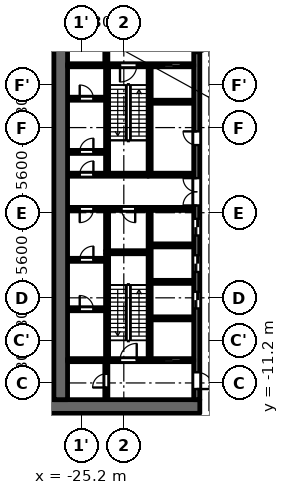
"""IFC4 building model, lengths in metres.
Left out: names, types, materials, properties, quantities, classifications, styles, units other than length and angle.
Written with IfcOpenShell. Run it as: python <this file> out.ifc"""

import sys

from ifc_helpers import new_model, si_unit, direction, frame, frame_2d, origin, place, context, subcontext, project, spatial, rectangle, extrude, element, fill, save


model = new_model("IFC4")
c1 = context("Model", 3, precision=1e-05, world=origin(), true_north=direction((0.0, 1.0)))
c2 = subcontext(c1, "Body", "Model", "MODEL_VIEW")
j1 = project(units=[si_unit("LENGTHUNIT", "METRE"), si_unit("PLANEANGLEUNIT", "RADIAN")], contexts=[c1])
p1 = place(None, origin())
s1 = spatial("IfcSite", under=j1, at=p1, CompositionType="ELEMENT")
p2 = place(p1, origin())
s2 = spatial("IfcBuilding", under=s1, at=p2, CompositionType="ELEMENT")
p3 = place(p2, frame((0.0, 0.0, 25.7)))
s3 = spatial("IfcBuildingStorey", under=s2, at=p3, CompositionType="ELEMENT", Elevation=25.7)
p4 = place(p3, frame((-23.5, -2.5, 0.0), z_axis=(0.0, 0.0, 1.0), x_axis=(0.0, 1.0, 0.0)))
e1 = element("IfcWall", 1, at=p4, inside=s3, PredefinedType="PARTITIONING", context=c2, shape_type="SweptSolid", body=[
    extrude(rectangle(XDim=2.65, YDim=0.2, at=frame_2d((1.325, 0.0))), origin(), (0.0, 0.0, 1.0), 4.45),
])
p5 = place(p3, frame((-20.7, 2.6, 0.0), z_axis=(0.0, 0.0, 1.0), x_axis=(0.0, 1.0, 0.0)))
e2 = element("IfcWall", 2, at=p5, inside=s3, PredefinedType="SHEAR", context=c2, shape_type="SweptSolid", body=[
    extrude(rectangle(XDim=7.0, YDim=0.2, at=frame_2d((3.5, 0.0))), origin(), (0.0, 0.0, 1.0), 4.45),
])
p6 = place(p3, frame((-20.7, -9.6, 0.0), z_axis=(0.0, 0.0, 1.0), x_axis=(0.0, 1.0, 0.0)))
e3 = element("IfcWall", 3, at=p6, inside=s3, PredefinedType="SHEAR", context=c2, shape_type="SweptSolid", body=[
    extrude(rectangle(XDim=9.75, YDim=0.2, at=frame_2d((4.875, 0.0))), origin(), (0.0, 0.0, 1.0), 4.45),
])
p7 = place(p3, frame((-20.8, 2.5, 0.0), z_axis=(0.0, 0.0, 1.0), x_axis=(-1.0, 0.0, 0.0)))
e4 = element("IfcWall", 4, at=p7, inside=s3, PredefinedType="SHEAR", context=c2, shape_type="SweptSolid", body=[
    extrude(rectangle(XDim=5.3, YDim=0.2, at=frame_2d((2.65, 0.0))), origin(), (0.0, 0.0, 1.0), 4.45),
])
p8 = place(p7, frame((3.6, 0.0, 0.0)))
e5 = element("IfcOpeningElement", 5, at=p8, cuts=e4, PredefinedType="OPENING", context=c2, shape_type="SweptSolid", body=[
    extrude(rectangle(XDim=0.9, YDim=2.1, at=frame_2d((0.45, 1.05))), frame((0.0, 0.11, 0.0), z_axis=(0.0, -1.0, 0.0), x_axis=(1.0, 0.0, 0.0)), (0.0, 0.0, 1.0), 0.22),
])
p9 = place(p3, frame((-20.8, 0.25, 0.0), z_axis=(0.0, 0.0, 1.0), x_axis=(-1.0, 0.0, 0.0)))
e6 = element("IfcWall", 6, at=p9, inside=s3, PredefinedType="PARTITIONING", context=c2, shape_type="SweptSolid", body=[
    extrude(rectangle(XDim=5.3, YDim=0.2, at=frame_2d((2.65, 0.0))), origin(), (0.0, 0.0, 1.0), 4.45),
])
p10 = place(p9, frame((0.85, 0.0, 0.0)))
e7 = element("IfcOpeningElement", 7, at=p10, cuts=e6, PredefinedType="OPENING", context=c2, shape_type="SweptSolid", body=[
    extrude(rectangle(XDim=0.9, YDim=2.1, at=frame_2d((0.45, 1.05))), frame((0.0, 0.11, 0.0), z_axis=(0.0, -1.0, 0.0), x_axis=(1.0, 0.0, 0.0)), (0.0, 0.0, 1.0), 0.22),
])
p11 = place(p9, frame((3.6, 0.0, 0.0)))
e8 = element("IfcOpeningElement", 8, at=p11, cuts=e6, PredefinedType="OPENING", context=c2, shape_type="SweptSolid", body=[
    extrude(rectangle(XDim=0.9, YDim=2.1, at=frame_2d((0.45, 1.05))), frame((0.0, 0.11, 0.0), z_axis=(0.0, -1.0, 0.0), x_axis=(1.0, 0.0, 0.0)), (0.0, 0.0, 1.0), 0.22),
])
p12 = place(p3, frame((-17.4, -12.75, 0.0), z_axis=(0.0, 0.0, 1.0), x_axis=(-1.0, 0.0, 0.0)))
e9 = element("IfcWall", 9, at=p12, inside=s3, PredefinedType="SHEAR", context=c2, shape_type="SweptSolid", body=[
    extrude(rectangle(XDim=10.4, YDim=0.9, at=frame_2d((5.2, 0.0))), origin(), (0.0, 0.0, 1.0), 4.45),
])
p13 = place(p3, frame((-17.6, -12.3, 0.0), z_axis=(0.0, 0.0, 1.0), x_axis=(0.0, 1.0, 0.0)))
e10 = element("IfcWall", 10, at=p13, inside=s3, PredefinedType="SHEAR", context=c2, shape_type="SweptSolid", body=[
    extrude(rectangle(XDim=24.6, YDim=0.4, at=frame_2d((12.3, 0.0))), origin(), (0.0, 0.0, 1.0), 4.45),
])
p14 = place(p13, frame((6.0, 0.0, 0.0)))
e11 = element("IfcOpeningElement", 11, at=p14, cuts=e10, PredefinedType="OPENING", context=c2, shape_type="SweptSolid", body=[
    extrude(rectangle(XDim=1.1, YDim=2.1, at=frame_2d((0.55, 1.05))), frame((0.0, 0.21, 0.0), z_axis=(0.0, -1.0, 0.0), x_axis=(1.0, 0.0, 0.0)), (0.0, 0.0, 1.0), 0.42),
])
p15 = place(p13, frame((8.4, 0.0, 0.0)))
e12 = element("IfcOpeningElement", 12, at=p15, cuts=e10, PredefinedType="OPENING", context=c2, shape_type="SweptSolid", body=[
    extrude(rectangle(XDim=1.1, YDim=2.1, at=frame_2d((0.55, 1.05))), frame((0.0, 0.21, 0.0), z_axis=(0.0, -1.0, 0.0), x_axis=(1.0, 0.0, 0.0)), (0.0, 0.0, 1.0), 0.42),
])
p16 = place(p13, frame((10.8, 0.0, 0.0)))
e13 = element("IfcOpeningElement", 13, at=p16, cuts=e10, PredefinedType="OPENING", context=c2, shape_type="SweptSolid", body=[
    extrude(rectangle(XDim=1.1, YDim=2.1, at=frame_2d((0.55, 1.05))), frame((0.0, 0.21, 0.0), z_axis=(0.0, -1.0, 0.0), x_axis=(1.0, 0.0, 0.0)), (0.0, 0.0, 1.0), 0.42),
])
p17 = place(p13, frame((16.75, 0.0, 0.0)))
e14 = element("IfcOpeningElement", 14, at=p17, cuts=e10, PredefinedType="OPENING", context=c2, shape_type="SweptSolid", body=[
    extrude(rectangle(XDim=0.9, YDim=2.1, at=frame_2d((0.45, 1.05))), frame((0.0, 0.21, 0.0), z_axis=(0.0, -1.0, 0.0), x_axis=(1.0, 0.0, 0.0)), (0.0, 0.0, 1.0), 0.42),
])
p18 = place(p13, frame((22.8, 0.0, 0.0)))
e15 = element("IfcOpeningElement", 15, at=p18, cuts=e10, PredefinedType="OPENING", context=c2, shape_type="SweptSolid", body=[
    extrude(rectangle(XDim=1.1, YDim=2.1, at=frame_2d((0.55, 1.05))), frame((0.0, 0.21, 0.0), z_axis=(0.0, -1.0, 0.0), x_axis=(1.0, 0.0, 0.0)), (0.0, 0.0, 1.0), 0.42),
])
p19 = place(p13, frame((0.7, 0.0, 0.0)))
e16 = element("IfcOpeningElement", 16, at=p19, cuts=e10, PredefinedType="OPENING", context=c2, shape_type="SweptSolid", body=[
    extrude(rectangle(XDim=1.1, YDim=2.1, at=frame_2d((0.55, 1.05))), frame((0.0, 0.21, 0.0), z_axis=(0.0, -1.0, 0.0), x_axis=(1.0, 0.0, 0.0)), (0.0, 0.0, 1.0), 0.42),
])
p20 = place(p13, frame((12.775, 0.0, 0.0)))
e17 = element("IfcOpeningElement", 17, at=p20, cuts=e10, PredefinedType="OPENING", context=c2, shape_type="SweptSolid", body=[
    extrude(rectangle(XDim=1.8, YDim=2.1, at=frame_2d((0.9, 1.05))), frame((0.0, 0.21, 0.0), z_axis=(0.0, -1.0, 0.0), x_axis=(1.0, 0.0, 0.0)), (0.0, 0.0, 1.0), 0.42),
])
p21 = place(p3, frame((-26.55, -12.3, 0.0), z_axis=(0.0, 0.0, 1.0), x_axis=(0.0, 1.0, 0.0)))
e18 = element("IfcWall", 18, at=p21, inside=s3, PredefinedType="SHEAR", context=c2, shape_type="SweptSolid", body=[
    extrude(rectangle(XDim=24.6, YDim=0.9, at=frame_2d((12.3, 0.0))), origin(), (0.0, 0.0, 1.0), 4.45),
])
p22 = place(p3, frame((-23.55, 9.8, 0.0), z_axis=(0.0, 0.0, 1.0), x_axis=(0.0, 1.0, 0.0)))
e19 = element("IfcWall", 19, at=p22, inside=s3, PredefinedType="PARTITIONING", context=c2, shape_type="SweptSolid", body=[
    extrude(rectangle(XDim=2.5, YDim=0.2, at=frame_2d((1.25, 0.0))), origin(), (0.0, 0.0, 1.0), 4.45),
])
p23 = place(p22, frame((0.8, 0.0, 0.0)))
e20 = element("IfcOpeningElement", 20, at=p23, cuts=e19, PredefinedType="OPENING", context=c2, shape_type="SweptSolid", body=[
    extrude(rectangle(XDim=0.9, YDim=2.1, at=frame_2d((0.45, 1.05))), frame((0.0, 0.11, 0.0), z_axis=(0.0, -1.0, 0.0), x_axis=(1.0, 0.0, 0.0)), (0.0, 0.0, 1.0), 0.22),
])
p24 = place(p3, frame((-23.55, -12.3, 0.0), z_axis=(0.0, 0.0, 1.0), x_axis=(0.0, 1.0, 0.0)))
e21 = element("IfcWall", 21, at=p24, inside=s3, PredefinedType="PARTITIONING", context=c2, shape_type="SweptSolid", body=[
    extrude(rectangle(XDim=2.5, YDim=0.2, at=frame_2d((1.25, 0.0))), origin(), (0.0, 0.0, 1.0), 4.45),
])
p25 = place(p24, frame((0.8, 0.0, 0.0)))
e22 = element("IfcOpeningElement", 22, at=p25, cuts=e21, PredefinedType="OPENING", context=c2, shape_type="SweptSolid", body=[
    extrude(rectangle(XDim=0.9, YDim=2.1, at=frame_2d((0.45, 1.05))), frame((0.0, 0.11, 0.0), z_axis=(0.0, -1.0, 0.0), x_axis=(1.0, 0.0, 0.0)), (0.0, 0.0, 1.0), 0.22),
])
p26 = place(p3, frame((-23.6, -6.35, 0.0), z_axis=(0.0, 0.0, 1.0), x_axis=(-1.0, 0.0, 0.0)))
e23 = element("IfcWall", 23, at=p26, inside=s3, PredefinedType="PARTITIONING", context=c2, shape_type="SweptSolid", body=[
    extrude(rectangle(XDim=2.5, YDim=0.2, at=frame_2d((1.25, 0.0))), origin(), (0.0, 0.0, 1.0), 4.45),
])
p27 = place(p26, frame((0.8, 0.0, 0.0)))
e24 = element("IfcOpeningElement", 24, at=p27, cuts=e23, PredefinedType="OPENING", context=c2, shape_type="SweptSolid", body=[
    extrude(rectangle(XDim=0.9, YDim=2.1, at=frame_2d((0.45, 1.05))), frame((0.0, 0.11, 0.0), z_axis=(0.0, -1.0, 0.0), x_axis=(1.0, 0.0, 0.0)), (0.0, 0.0, 1.0), 0.22),
])
p28 = place(p3, frame((-23.6, -3.1, 0.0), z_axis=(0.0, 0.0, 1.0), x_axis=(-1.0, 0.0, 0.0)))
e25 = element("IfcWall", 25, at=p28, inside=s3, PredefinedType="PARTITIONING", context=c2, shape_type="SweptSolid", body=[
    extrude(rectangle(XDim=2.5, YDim=0.2, at=frame_2d((1.25, 0.0))), origin(), (0.0, 0.0, 1.0), 4.45),
])
p29 = place(p28, frame((0.8, 0.0, 0.0)))
e26 = element("IfcOpeningElement", 26, at=p29, cuts=e25, PredefinedType="OPENING", context=c2, shape_type="SweptSolid", body=[
    extrude(rectangle(XDim=0.9, YDim=2.1, at=frame_2d((0.45, 1.05))), frame((0.0, 0.11, 0.0), z_axis=(0.0, -1.0, 0.0), x_axis=(1.0, 0.0, 0.0)), (0.0, 0.0, 1.0), 0.22),
])
p30 = place(p3, frame((-23.6, 4.0, 0.0), z_axis=(0.0, 0.0, 1.0), x_axis=(-1.0, 0.0, 0.0)))
e27 = element("IfcWall", 27, at=p30, inside=s3, PredefinedType="PARTITIONING", context=c2, shape_type="SweptSolid", body=[
    extrude(rectangle(XDim=2.5, YDim=0.2, at=frame_2d((1.25, 0.0))), origin(), (0.0, 0.0, 1.0), 4.45),
])
p31 = place(p30, frame((0.8, 0.0, 0.0)))
e28 = element("IfcOpeningElement", 28, at=p31, cuts=e27, PredefinedType="OPENING", context=c2, shape_type="SweptSolid", body=[
    extrude(rectangle(XDim=0.9, YDim=2.1, at=frame_2d((0.45, 1.05))), frame((0.0, 0.11, 0.0), z_axis=(0.0, -1.0, 0.0), x_axis=(1.0, 0.0, 0.0)), (0.0, 0.0, 1.0), 0.22),
])
p32 = place(p3, frame((-23.6, 7.5, 0.0), z_axis=(0.0, 0.0, 1.0), x_axis=(-1.0, 0.0, 0.0)))
e29 = element("IfcWall", 29, at=p32, inside=s3, PredefinedType="PARTITIONING", context=c2, shape_type="SweptSolid", body=[
    extrude(rectangle(XDim=2.5, YDim=0.2, at=frame_2d((1.25, 0.0))), origin(), (0.0, 0.0, 1.0), 4.45),
])
p33 = place(p32, frame((0.8, 0.0, 0.0)))
e30 = element("IfcOpeningElement", 30, at=p33, cuts=e29, PredefinedType="OPENING", context=c2, shape_type="SweptSolid", body=[
    extrude(rectangle(XDim=0.9, YDim=2.1, at=frame_2d((0.45, 1.05))), frame((0.0, 0.11, 0.0), z_axis=(0.0, -1.0, 0.0), x_axis=(1.0, 0.0, 0.0)), (0.0, 0.0, 1.0), 0.22),
])
p34 = place(p3, frame((-17.8, -9.7, 0.0), z_axis=(0.0, 0.0, 1.0), x_axis=(-1.0, 0.0, 0.0)))
e31 = element("IfcWall", 31, at=p34, inside=s3, PredefinedType="SHEAR", context=c2, shape_type="SweptSolid", body=[
    extrude(rectangle(XDim=8.3, YDim=0.2, at=frame_2d((4.15, 0.0))), origin(), (0.0, 0.0, 1.0), 4.45),
])
p35 = place(p34, frame((0.85, 0.0, 0.0)))
e32 = element("IfcOpeningElement", 32, at=p35, cuts=e31, PredefinedType="OPENING", context=c2, shape_type="SweptSolid", body=[
    extrude(rectangle(XDim=1.1, YDim=2.1, at=frame_2d((0.55, 1.05))), frame((0.0, 0.11, 0.0), z_axis=(0.0, -1.0, 0.0), x_axis=(1.0, 0.0, 0.0)), (0.0, 0.0, 1.0), 0.22),
])
p36 = place(p34, frame((3.75, 0.0, 0.0)))
e33 = element("IfcOpeningElement", 33, at=p36, cuts=e31, PredefinedType="OPENING", context=c2, shape_type="SweptSolid", body=[
    extrude(rectangle(XDim=1.1, YDim=2.1, at=frame_2d((0.55, 1.05))), frame((0.0, 0.11, 0.0), z_axis=(0.0, -1.0, 0.0), x_axis=(1.0, 0.0, 0.0)), (0.0, 0.0, 1.0), 0.22),
])
for number, where, z_axis, x_axis in (
    (34, (-17.8, -6.95, 0.0), (0.0, 0.0, 1.0), (-1.0, 0.0, 0.0)),
    (35, (-17.8, -4.55, 0.0), (0.0, 0.0, 1.0), (-1.0, 0.0, 0.0)),
    (36, (-17.8, -2.15, 0.0), (0.0, 0.0, 1.0), (-1.0, 0.0, 0.0)),
):
    element("IfcWall", number, at=place(p3, frame(where, z_axis=z_axis, x_axis=x_axis)), inside=s3, PredefinedType="PARTITIONING", context=c2, shape_type="SweptSolid", body=[
        extrude(rectangle(XDim=2.8, YDim=0.2, at=frame_2d((1.4, 0.0))), origin(), (0.0, 0.0, 1.0), 4.45),
    ])
for number, where, z_axis, x_axis in (
    (37, (-17.8, 0.25, 0.0), (0.0, 0.0, 1.0), (-1.0, 0.0, 0.0)),
    (38, (-17.8, 2.5, 0.0), (0.0, 0.0, 1.0), (-1.0, 0.0, 0.0)),
):
    element("IfcWall", number, at=place(p3, frame(where, z_axis=z_axis, x_axis=x_axis)), inside=s3, PredefinedType="PARTITIONING", context=c2, shape_type="SweptSolid", body=[
        extrude(rectangle(XDim=3.0, YDim=0.2, at=frame_2d((1.5, 0.0))), origin(), (0.0, 0.0, 1.0), 4.45),
    ])
p37 = place(p3, frame((-17.8, 7.3, 0.0), z_axis=(0.0, 0.0, 1.0), x_axis=(-1.0, 0.0, 0.0)))
e39 = element("IfcWall", 39, at=p37, inside=s3, PredefinedType="PARTITIONING", context=c2, shape_type="SweptSolid", body=[
    extrude(rectangle(XDim=2.8, YDim=0.2, at=frame_2d((1.4, 0.0))), origin(), (0.0, 0.0, 1.0), 4.45),
])
p38 = place(p3, frame((-17.8, 9.7, 0.0), z_axis=(0.0, 0.0, 1.0), x_axis=(-1.0, 0.0, 0.0)))
e40 = element("IfcWall", 40, at=p38, inside=s3, PredefinedType="SHEAR", context=c2, shape_type="SweptSolid", body=[
    extrude(rectangle(XDim=8.3, YDim=0.2, at=frame_2d((4.15, 0.0))), origin(), (0.0, 0.0, 1.0), 4.45),
])
p39 = place(p38, frame((0.85, 0.0, 0.0)))
e41 = element("IfcOpeningElement", 41, at=p39, cuts=e40, PredefinedType="OPENING", context=c2, shape_type="SweptSolid", body=[
    extrude(rectangle(XDim=1.1, YDim=2.1, at=frame_2d((0.55, 1.05))), frame((0.0, 0.11, 0.0), z_axis=(0.0, -1.0, 0.0), x_axis=(1.0, 0.0, 0.0)), (0.0, 0.0, 1.0), 0.22),
])
p40 = place(p38, frame((3.75, 0.0, 0.0)))
e42 = element("IfcOpeningElement", 42, at=p40, cuts=e40, PredefinedType="OPENING", context=c2, shape_type="SweptSolid", body=[
    extrude(rectangle(XDim=1.1, YDim=2.1, at=frame_2d((0.55, 1.05))), frame((0.0, 0.11, 0.0), z_axis=(0.0, -1.0, 0.0), x_axis=(1.0, 0.0, 0.0)), (0.0, 0.0, 1.0), 0.22),
])
p41 = place(p3, frame((-23.5, 2.6, 0.0), z_axis=(0.0, 0.0, 1.0), x_axis=(0.0, 1.0, 0.0)))
e43 = element("IfcWall", 43, at=p41, inside=s3, PredefinedType="SHEAR", context=c2, shape_type="SweptSolid", body=[
    extrude(rectangle(XDim=7.0, YDim=0.2, at=frame_2d((3.5, 0.0))), origin(), (0.0, 0.0, 1.0), 4.45),
])
p42 = place(p3, frame((-23.5, -9.6, 0.0), z_axis=(0.0, 0.0, 1.0), x_axis=(0.0, 1.0, 0.0)))
e44 = element("IfcWall", 44, at=p42, inside=s3, PredefinedType="SHEAR", context=c2, shape_type="SweptSolid", body=[
    extrude(rectangle(XDim=6.9, YDim=0.2, at=frame_2d((3.45, 0.0))), origin(), (0.0, 0.0, 1.0), 4.45),
])
p43 = place(p3, frame((-20.8, -2.6, 0.0), z_axis=(0.0, 0.0, 1.0), x_axis=(-1.0, 0.0, 0.0)))
e45 = element("IfcWall", 45, at=p43, inside=s3, PredefinedType="SHEAR", context=c2, shape_type="SweptSolid", body=[
    extrude(rectangle(XDim=2.8, YDim=0.2, at=frame_2d((1.4, 0.0))), origin(), (0.0, 0.0, 1.0), 4.45),
])
p44 = place(p35, origin())
e46 = element("IfcDoor", 46, at=p44, inside=s3, OperationType="DOUBLE_DOOR_SLIDING", PredefinedType="DOOR", context=c2, shape_type="SweptSolid", body=[
    extrude(rectangle(XDim=1.1, YDim=2.1, at=frame_2d((0.55, 1.05))), frame((0.0, 0.025, 0.0), z_axis=(0.0, -1.0, 0.0), x_axis=(1.0, 0.0, 0.0)), (0.0, 0.0, 1.0), 0.05),
])
fill(e32, e46)
p45 = place(p14, origin())
e47 = element("IfcDoor", 47, at=p45, inside=s3, OperationType="DOUBLE_DOOR_SLIDING", PredefinedType="DOOR", context=c2, shape_type="SweptSolid", body=[
    extrude(rectangle(XDim=1.1, YDim=2.1, at=frame_2d((0.55, 1.05))), frame((0.0, 0.025, 0.0), z_axis=(0.0, -1.0, 0.0), x_axis=(1.0, 0.0, 0.0)), (0.0, 0.0, 1.0), 0.05),
])
fill(e11, e47)
p46 = place(p15, origin())
e48 = element("IfcDoor", 48, at=p46, inside=s3, OperationType="DOUBLE_DOOR_SLIDING", PredefinedType="DOOR", context=c2, shape_type="SweptSolid", body=[
    extrude(rectangle(XDim=1.1, YDim=2.1, at=frame_2d((0.55, 1.05))), frame((0.0, 0.025, 0.0), z_axis=(0.0, -1.0, 0.0), x_axis=(1.0, 0.0, 0.0)), (0.0, 0.0, 1.0), 0.05),
])
fill(e12, e48)
p47 = place(p16, origin())
e49 = element("IfcDoor", 49, at=p47, inside=s3, OperationType="DOUBLE_DOOR_SLIDING", PredefinedType="DOOR", context=c2, shape_type="SweptSolid", body=[
    extrude(rectangle(XDim=1.1, YDim=2.1, at=frame_2d((0.55, 1.05))), frame((0.0, 0.025, 0.0), z_axis=(0.0, -1.0, 0.0), x_axis=(1.0, 0.0, 0.0)), (0.0, 0.0, 1.0), 0.05),
])
fill(e13, e49)
p48 = place(p17, origin())
e50 = element("IfcDoor", 50, at=p48, inside=s3, OperationType="SINGLE_SWING_LEFT", PredefinedType="DOOR", context=c2, shape_type="SweptSolid", body=[
    extrude(rectangle(XDim=0.9, YDim=2.1, at=frame_2d((0.45, 1.05))), frame((0.0, 0.025, 0.0), z_axis=(0.0, -1.0, 0.0), x_axis=(1.0, 0.0, 0.0)), (0.0, 0.0, 1.0), 0.05),
])
fill(e14, e50)
p49 = place(p39, origin())
e51 = element("IfcDoor", 51, at=p49, inside=s3, OperationType="DOUBLE_DOOR_SLIDING", PredefinedType="DOOR", context=c2, shape_type="SweptSolid", body=[
    extrude(rectangle(XDim=1.1, YDim=2.1, at=frame_2d((0.55, 1.05))), frame((0.0, 0.025, 0.0), z_axis=(0.0, -1.0, 0.0), x_axis=(1.0, 0.0, 0.0)), (0.0, 0.0, 1.0), 0.05),
])
fill(e41, e51)
p50 = place(p18, origin())
e52 = element("IfcDoor", 52, at=p50, inside=s3, OperationType="SINGLE_SWING_RIGHT", PredefinedType="DOOR", context=c2, shape_type="SweptSolid", body=[
    extrude(rectangle(XDim=1.1, YDim=2.1, at=frame_2d((0.55, 1.05))), frame((0.0, 0.025, 0.0), z_axis=(0.0, -1.0, 0.0), x_axis=(1.0, 0.0, 0.0)), (0.0, 0.0, 1.0), 0.05),
])
fill(e15, e52)
p51 = place(p19, origin())
e53 = element("IfcDoor", 53, at=p51, inside=s3, OperationType="SINGLE_SWING_LEFT", PredefinedType="DOOR", context=c2, shape_type="SweptSolid", body=[
    extrude(rectangle(XDim=1.1, YDim=2.1, at=frame_2d((0.55, 1.05))), frame((0.0, 0.025, 0.0), z_axis=(0.0, -1.0, 0.0), x_axis=(1.0, 0.0, 0.0)), (0.0, 0.0, 1.0), 0.05),
])
fill(e16, e53)
p52 = place(p25, origin())
e54 = element("IfcDoor", 54, at=p52, inside=s3, OperationType="SINGLE_SWING_RIGHT", PredefinedType="DOOR", context=c2, shape_type="SweptSolid", body=[
    extrude(rectangle(XDim=0.9, YDim=2.1, at=frame_2d((0.45, 1.05))), frame((0.0, 0.025, 0.0), z_axis=(0.0, -1.0, 0.0), x_axis=(1.0, 0.0, 0.0)), (0.0, 0.0, 1.0), 0.05),
])
fill(e22, e54)
p53 = place(p40, origin())
e55 = element("IfcDoor", 55, at=p53, inside=s3, OperationType="SINGLE_SWING_LEFT", PredefinedType="DOOR", context=c2, shape_type="SweptSolid", body=[
    extrude(rectangle(XDim=1.1, YDim=2.1, at=frame_2d((0.55, 1.05))), frame((0.0, 0.025, 0.0), z_axis=(0.0, -1.0, 0.0), x_axis=(1.0, 0.0, 0.0)), (0.0, 0.0, 1.0), 0.05),
])
fill(e42, e55)
p54 = place(p36, origin())
e56 = element("IfcDoor", 56, at=p54, inside=s3, OperationType="SINGLE_SWING_LEFT", PredefinedType="DOOR", context=c2, shape_type="SweptSolid", body=[
    extrude(rectangle(XDim=1.1, YDim=2.1, at=frame_2d((0.55, 1.05))), frame((0.0, 0.025, 0.0), z_axis=(0.0, -1.0, 0.0), x_axis=(1.0, 0.0, 0.0)), (0.0, 0.0, 1.0), 0.05),
])
fill(e33, e56)
p55 = place(p20, origin())
e57 = element("IfcDoor", 57, at=p55, inside=s3, OperationType="DOUBLE_DOOR_SINGLE_SWING", PredefinedType="DOOR", context=c2, shape_type="SweptSolid", body=[
    extrude(rectangle(XDim=1.8, YDim=2.1, at=frame_2d((0.9, 1.05))), frame((0.0, 0.025, 0.0), z_axis=(0.0, -1.0, 0.0), x_axis=(1.0, 0.0, 0.0)), (0.0, 0.0, 1.0), 0.05),
])
fill(e17, e57)
p56 = place(p10, origin())
e58 = element("IfcDoor", 58, at=p56, inside=s3, OperationType="SINGLE_SWING_RIGHT", PredefinedType="DOOR", context=c2, shape_type="SweptSolid", body=[
    extrude(rectangle(XDim=0.9, YDim=2.1, at=frame_2d((0.45, 1.05))), frame((0.0, 0.025, 0.0), z_axis=(0.0, -1.0, 0.0), x_axis=(1.0, 0.0, 0.0)), (0.0, 0.0, 1.0), 0.05),
])
fill(e7, e58)
p57 = place(p27, origin())
e59 = element("IfcDoor", 59, at=p57, inside=s3, OperationType="SINGLE_SWING_RIGHT", PredefinedType="DOOR", context=c2, shape_type="SweptSolid", body=[
    extrude(rectangle(XDim=0.9, YDim=2.1, at=frame_2d((0.45, 1.05))), frame((0.0, 0.025, 0.0), z_axis=(0.0, -1.0, 0.0), x_axis=(1.0, 0.0, 0.0)), (0.0, 0.0, 1.0), 0.05),
])
fill(e24, e59)
p58 = place(p29, origin())
e60 = element("IfcDoor", 60, at=p58, inside=s3, OperationType="SINGLE_SWING_LEFT", PredefinedType="DOOR", context=c2, shape_type="SweptSolid", body=[
    extrude(rectangle(XDim=0.9, YDim=2.1, at=frame_2d((0.45, 1.05))), frame((0.0, 0.025, 0.0), z_axis=(0.0, -1.0, 0.0), x_axis=(1.0, 0.0, 0.0)), (0.0, 0.0, 1.0), 0.05),
])
fill(e26, e60)
p59 = place(p11, origin())
e61 = element("IfcDoor", 61, at=p59, inside=s3, OperationType="SINGLE_SWING_LEFT", PredefinedType="DOOR", context=c2, shape_type="SweptSolid", body=[
    extrude(rectangle(XDim=0.9, YDim=2.1, at=frame_2d((0.45, 1.05))), frame((0.0, 0.025, 0.0), z_axis=(0.0, -1.0, 0.0), x_axis=(1.0, 0.0, 0.0)), (0.0, 0.0, 1.0), 0.05),
])
fill(e8, e61)
p60 = place(p31, origin())
e62 = element("IfcDoor", 62, at=p60, inside=s3, OperationType="SINGLE_SWING_LEFT", PredefinedType="DOOR", context=c2, shape_type="SweptSolid", body=[
    extrude(rectangle(XDim=0.9, YDim=2.1, at=frame_2d((0.45, 1.05))), frame((0.0, 0.025, 0.0), z_axis=(0.0, -1.0, 0.0), x_axis=(1.0, 0.0, 0.0)), (0.0, 0.0, 1.0), 0.05),
])
fill(e28, e62)
p61 = place(p33, origin())
e63 = element("IfcDoor", 63, at=p61, inside=s3, OperationType="SINGLE_SWING_RIGHT", PredefinedType="DOOR", context=c2, shape_type="SweptSolid", body=[
    extrude(rectangle(XDim=0.9, YDim=2.1, at=frame_2d((0.45, 1.05))), frame((0.0, 0.025, 0.0), z_axis=(0.0, -1.0, 0.0), x_axis=(1.0, 0.0, 0.0)), (0.0, 0.0, 1.0), 0.05),
])
fill(e30, e63)
p62 = place(p8, origin())
e64 = element("IfcDoor", 64, at=p62, inside=s3, OperationType="SINGLE_SWING_LEFT", PredefinedType="DOOR", context=c2, shape_type="SweptSolid", body=[
    extrude(rectangle(XDim=0.9, YDim=2.1, at=frame_2d((0.45, 1.05))), frame((0.0, 0.025, 0.0), z_axis=(0.0, -1.0, 0.0), x_axis=(1.0, 0.0, 0.0)), (0.0, 0.0, 1.0), 0.05),
])
fill(e5, e64)
save(model, sys.argv[1])
